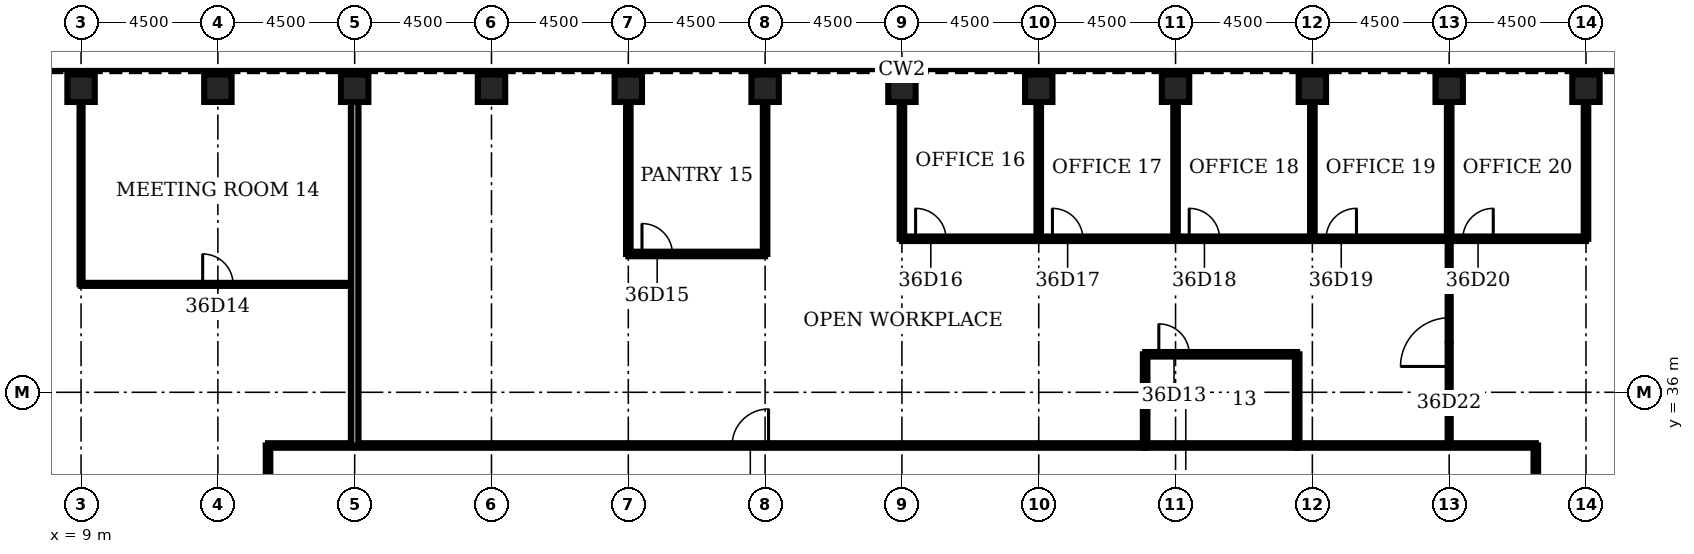
"""IFC4 building model, lengths in metres.
Left out: names, types, materials, properties, quantities, classifications, styles, units other than length and angle.
Written with IfcOpenShell. Run it as: python <this file> out.ifc"""

import sys

from ifc_helpers import new_model, si_unit, direction, frame, frame_2d, origin, origin_2d, place, context, subcontext, project, spatial, rectangle, hollow_rectangle, extrude, element, fill, save


model = new_model("IFC4")
c1 = context("Model", 3, precision=1e-05, world=origin(), true_north=direction((0.0, 1.0)))
c2 = subcontext(c1, "Body", "Model", "MODEL_VIEW")
j1 = project(units=[si_unit("LENGTHUNIT", "METRE"), si_unit("PLANEANGLEUNIT", "RADIAN")], contexts=[c1])
p1 = place(None, origin())
s1 = spatial("IfcSite", under=j1, at=p1, CompositionType="ELEMENT")
p2 = place(p1, origin())
s2 = spatial("IfcBuilding", under=s1, at=p2, CompositionType="ELEMENT")
p3 = place(p2, frame((0.0, 0.0, 163.5)))
s3 = spatial("IfcBuildingStorey", under=s2, at=p3, CompositionType="ELEMENT", Elevation=163.5)
for number, where, z_axis, x_axis in (
    (1, (58.5, 46.0, 0.0), (0.0, 0.0, 1.0), (0.0, 1.0, 0.0)),
    (2, (54.0, 46.0, 0.0), (0.0, 0.0, 1.0), (0.0, 1.0, 0.0)),
    (3, (49.5, 46.0, 0.0), (0.0, 0.0, 1.0), (0.0, 1.0, 0.0)),
    (4, (45.0, 46.0, 0.0), (0.0, 0.0, 1.0), (0.0, 1.0, 0.0)),
    (5, (40.5, 46.0, 0.0), (0.0, 0.0, 1.0), (0.0, 1.0, 0.0)),
    (6, (36.0, 46.0, 0.0), (0.0, 0.0, 1.0), (0.0, 1.0, 0.0)),
    (7, (31.5, 46.0, 0.0), (0.0, 0.0, 1.0), (0.0, 1.0, 0.0)),
    (8, (27.0, 46.0, 0.0), (0.0, 0.0, 1.0), (0.0, 1.0, 0.0)),
    (9, (22.5, 46.0, 0.0), (0.0, 0.0, 1.0), (0.0, 1.0, 0.0)),
    (10, (18.0, 46.0, 0.0), (0.0, 0.0, 1.0), (0.0, 1.0, 0.0)),
    (11, (13.5, 46.0, 0.0), (0.0, 0.0, 1.0), (0.0, 1.0, 0.0)),
    (12, (9.0, 46.0, 0.0), (0.0, 0.0, 1.0), (0.0, 1.0, 0.0)),
):
    element("IfcColumn", number, at=place(p3, frame(where, z_axis=z_axis, x_axis=x_axis)), inside=s3, PredefinedType="COLUMN", context=c2, shape_type="SweptSolid", body=[
        extrude(hollow_rectangle(XDim=0.9, YDim=0.9, WallThickness=0.09, at=origin_2d()), origin(), (0.0, 0.0, 1.0), 4.2),
    ])
p4 = place(p3, frame((15.15, 34.25, 0.0), z_axis=(0.0, 0.0, 1.0), x_axis=(1.0, 0.0, 0.0)))
e13 = element("IfcWall", 13, at=p4, inside=s3, PredefinedType="PARTITIONING", context=c2, shape_type="SweptSolid", body=[
    extrude(rectangle(XDim=28.85, YDim=0.15, at=frame_2d((14.425, 0.0))), origin(), (0.0, 0.0, 1.0), 3.0),
])
p5 = place(p4, frame((15.263, 0.0, 0.0)))
e14 = element("IfcOpeningElement", 14, at=p5, cuts=e13, PredefinedType="OPENING", context=c2, shape_type="SweptSolid", body=[
    extrude(rectangle(XDim=1.2, YDim=2.1, at=frame_2d((0.6, 1.05))), frame((0.0, 0.085, 0.0), z_axis=(0.0, -1.0, 0.0), x_axis=(1.0, 0.0, 0.0)), (0.0, 0.0, 1.0), 0.17),
])
p6 = place(p3, frame((44.0, 34.25, 0.0), z_axis=(0.0, 0.0, 1.0), x_axis=(1.0, 0.0, 0.0)))
e15 = element("IfcWall", 15, at=p6, inside=s3, PredefinedType="PARTITIONING", context=c2, shape_type="SweptSolid", body=[
    extrude(rectangle(XDim=5.0, YDim=0.15, at=frame_2d((2.5, 0.0))), origin(), (0.0, 0.0, 1.0), 3.0),
])
p7 = place(p3, frame((49.0, 34.25, 0.0), z_axis=(0.0, 0.0, 1.0), x_axis=(1.0, 0.0, 0.0)))
e16 = element("IfcWall", 16, at=p7, inside=s3, PredefinedType="PARTITIONING", context=c2, shape_type="SweptSolid", body=[
    extrude(rectangle(XDim=7.85, YDim=0.15, at=frame_2d((3.925, 0.0))), origin(), (0.0, 0.0, 1.0), 3.0),
])
p8 = place(p3, frame((44.0, 37.25, 0.0), z_axis=(0.0, 0.0, 1.0), x_axis=(1.0, 0.0, 0.0)))
e17 = element("IfcWall", 17, at=p8, inside=s3, PredefinedType="PARTITIONING", context=c2, shape_type="SweptSolid", body=[
    extrude(rectangle(XDim=5.0, YDim=0.15, at=frame_2d((2.5, 0.0))), origin(), (0.0, 0.0, 1.0), 3.0),
])
p9 = place(p8, frame((0.45, 0.0, 0.0)))
e18 = element("IfcOpeningElement", 18, at=p9, cuts=e17, PredefinedType="OPENING", context=c2, shape_type="SweptSolid", body=[
    extrude(rectangle(XDim=1.0, YDim=2.1, at=frame_2d((0.5, 1.05))), frame((0.0, 0.085, 0.0), z_axis=(0.0, -1.0, 0.0), x_axis=(1.0, 0.0, 0.0)), (0.0, 0.0, 1.0), 0.17),
])
p10 = place(p3, frame((9.0, 39.55, 0.0), z_axis=(0.0, 0.0, 1.0), x_axis=(1.0, 0.0, 0.0)))
e19 = element("IfcWall", 19, at=p10, inside=s3, PredefinedType="PARTITIONING", context=c2, shape_type="SweptSolid", body=[
    extrude(rectangle(XDim=9.0, YDim=0.1, at=frame_2d((4.5, 0.0))), origin(), (0.0, 0.0, 1.0), 3.0),
])
p11 = place(p10, frame((4.0, 0.0, 0.0)))
e20 = element("IfcOpeningElement", 20, at=p11, cuts=e19, PredefinedType="OPENING", context=c2, shape_type="SweptSolid", body=[
    extrude(rectangle(XDim=1.0, YDim=2.1, at=frame_2d((0.5, 1.05))), frame((0.0, 0.06, 0.0), z_axis=(0.0, -1.0, 0.0), x_axis=(1.0, 0.0, 0.0)), (0.0, 0.0, 1.0), 0.12),
])
p12 = place(p3, frame((27.0, 40.55, 0.0), z_axis=(0.0, 0.0, 1.0), x_axis=(1.0, 0.0, 0.0)))
e21 = element("IfcWall", 21, at=p12, inside=s3, PredefinedType="PARTITIONING", context=c2, shape_type="SweptSolid", body=[
    extrude(rectangle(XDim=4.5, YDim=0.15, at=frame_2d((2.25, 0.0))), origin(), (0.0, 0.0, 1.0), 3.0),
])
p13 = place(p12, frame((0.45, 0.0, 0.0)))
e22 = element("IfcOpeningElement", 22, at=p13, cuts=e21, PredefinedType="OPENING", context=c2, shape_type="SweptSolid", body=[
    extrude(rectangle(XDim=1.0, YDim=2.1, at=frame_2d((0.5, 1.05))), frame((0.0, 0.085, 0.0), z_axis=(0.0, -1.0, 0.0), x_axis=(1.0, 0.0, 0.0)), (0.0, 0.0, 1.0), 0.17),
])
p14 = place(p3, frame((36.0, 41.05, 0.0), z_axis=(0.0, 0.0, 1.0), x_axis=(1.0, 0.0, 0.0)))
e23 = element("IfcWall", 23, at=p14, inside=s3, PredefinedType="PARTITIONING", context=c2, shape_type="SweptSolid", body=[
    extrude(rectangle(XDim=22.5, YDim=0.15, at=frame_2d((11.25, 0.0))), origin(), (0.0, 0.0, 1.0), 3.0),
])
p15 = place(p14, frame((0.45, 0.0, 0.0)))
e24 = element("IfcOpeningElement", 24, at=p15, cuts=e23, PredefinedType="OPENING", context=c2, shape_type="SweptSolid", body=[
    extrude(rectangle(XDim=1.0, YDim=2.1, at=frame_2d((0.5, 1.05))), frame((0.0, 0.085, 0.0), z_axis=(0.0, -1.0, 0.0), x_axis=(1.0, 0.0, 0.0)), (0.0, 0.0, 1.0), 0.17),
])
p16 = place(p14, frame((4.95, 0.0, 0.0)))
e25 = element("IfcOpeningElement", 25, at=p16, cuts=e23, PredefinedType="OPENING", context=c2, shape_type="SweptSolid", body=[
    extrude(rectangle(XDim=1.0, YDim=2.1, at=frame_2d((0.5, 1.05))), frame((0.0, 0.085, 0.0), z_axis=(0.0, -1.0, 0.0), x_axis=(1.0, 0.0, 0.0)), (0.0, 0.0, 1.0), 0.17),
])
p17 = place(p14, frame((9.45, 0.0, 0.0)))
e26 = element("IfcOpeningElement", 26, at=p17, cuts=e23, PredefinedType="OPENING", context=c2, shape_type="SweptSolid", body=[
    extrude(rectangle(XDim=1.0, YDim=2.1, at=frame_2d((0.5, 1.05))), frame((0.0, 0.085, 0.0), z_axis=(0.0, -1.0, 0.0), x_axis=(1.0, 0.0, 0.0)), (0.0, 0.0, 1.0), 0.17),
])
p18 = place(p14, frame((13.95, 0.0, 0.0)))
e27 = element("IfcOpeningElement", 27, at=p18, cuts=e23, PredefinedType="OPENING", context=c2, shape_type="SweptSolid", body=[
    extrude(rectangle(XDim=1.0, YDim=2.1, at=frame_2d((0.5, 1.05))), frame((0.0, 0.085, 0.0), z_axis=(0.0, -1.0, 0.0), x_axis=(1.0, 0.0, 0.0)), (0.0, 0.0, 1.0), 0.17),
])
p19 = place(p14, frame((18.45, 0.0, 0.0)))
e28 = element("IfcOpeningElement", 28, at=p19, cuts=e23, PredefinedType="OPENING", context=c2, shape_type="SweptSolid", body=[
    extrude(rectangle(XDim=1.0, YDim=2.1, at=frame_2d((0.5, 1.05))), frame((0.0, 0.085, 0.0), z_axis=(0.0, -1.0, 0.0), x_axis=(1.0, 0.0, 0.0)), (0.0, 0.0, 1.0), 0.17),
])
p20 = place(p3, frame((9.0, 39.55, 0.0), z_axis=(0.0, 0.0, 1.0), x_axis=(0.0, 1.0, 0.0)))
e29 = element("IfcWall", 29, at=p20, inside=s3, PredefinedType="PARTITIONING", context=c2, shape_type="SweptSolid", body=[
    extrude(rectangle(XDim=6.0, YDim=0.1, at=frame_2d((3.0, 0.0))), origin(), (0.0, 0.0, 1.0), 3.0),
])
p21 = place(p3, frame((15.15, 13.75, 0.0), z_axis=(0.0, 0.0, 1.0), x_axis=(0.0, 1.0, 0.0)))
e30 = element("IfcWall", 30, at=p21, inside=s3, PredefinedType="PARTITIONING", context=c2, shape_type="SweptSolid", body=[
    extrude(rectangle(XDim=20.5, YDim=0.15, at=frame_2d((10.25, 0.0))), origin(), (0.0, 0.0, 1.0), 3.0),
])
p22 = place(p21, frame((9.65, 0.0, 0.0)))
e31 = element("IfcOpeningElement", 31, at=p22, cuts=e30, PredefinedType="OPENING", context=c2, shape_type="SweptSolid", body=[
    extrude(rectangle(XDim=1.2, YDim=2.1, at=frame_2d((0.6, 1.05))), frame((0.0, 0.085, 0.0), z_axis=(0.0, -1.0, 0.0), x_axis=(1.0, 0.0, 0.0)), (0.0, 0.0, 1.0), 0.17),
])
p23 = place(p3, frame((18.0, 34.25, 0.0), z_axis=(0.0, 0.0, 1.0), x_axis=(0.0, 1.0, 0.0)))
e32 = element("IfcWall", 32, at=p23, inside=s3, PredefinedType="PARTITIONING", context=c2, shape_type="SweptSolid", body=[
    extrude(rectangle(XDim=11.3, YDim=0.25, at=frame_2d((5.65, 0.0))), origin(), (0.0, 0.0, 1.0), 3.0),
])
for number, where, z_axis, x_axis in (
    (33, (27.0, 40.55, 0.0), (0.0, 0.0, 1.0), (0.0, 1.0, 0.0)),
    (34, (31.5, 40.55, 0.0), (0.0, 0.0, 1.0), (0.0, 1.0, 0.0)),
):
    element("IfcWall", number, at=place(p3, frame(where, z_axis=z_axis, x_axis=x_axis)), inside=s3, PredefinedType="PARTITIONING", context=c2, shape_type="SweptSolid", body=[
        extrude(rectangle(XDim=5.0, YDim=0.15, at=frame_2d((2.5, 0.0))), origin(), (0.0, 0.0, 1.0), 3.0),
    ])
for number, where, z_axis, x_axis in (
    (35, (36.0, 41.05, 0.0), (0.0, 0.0, 1.0), (0.0, 1.0, 0.0)),
    (36, (40.5, 41.05, 0.0), (0.0, 0.0, 1.0), (0.0, 1.0, 0.0)),
):
    element("IfcWall", number, at=place(p3, frame(where, z_axis=z_axis, x_axis=x_axis)), inside=s3, PredefinedType="PARTITIONING", context=c2, shape_type="SweptSolid", body=[
        extrude(rectangle(XDim=4.5, YDim=0.15, at=frame_2d((2.25, 0.0))), origin(), (0.0, 0.0, 1.0), 3.0),
    ])
p24 = place(p3, frame((44.0, 34.25, 0.0), z_axis=(0.0, 0.0, 1.0), x_axis=(0.0, 1.0, 0.0)))
e37 = element("IfcWall", 37, at=p24, inside=s3, PredefinedType="PARTITIONING", context=c2, shape_type="SweptSolid", body=[
    extrude(rectangle(XDim=3.0, YDim=0.15, at=frame_2d((1.5, 0.0))), origin(), (0.0, 0.0, 1.0), 3.0),
])
p25 = place(p3, frame((45.0, 41.05, 0.0), z_axis=(0.0, 0.0, 1.0), x_axis=(0.0, 1.0, 0.0)))
e38 = element("IfcWall", 38, at=p25, inside=s3, PredefinedType="PARTITIONING", context=c2, shape_type="SweptSolid", body=[
    extrude(rectangle(XDim=4.5, YDim=0.15, at=frame_2d((2.25, 0.0))), origin(), (0.0, 0.0, 1.0), 3.0),
])
p26 = place(p3, frame((49.0, 34.25, 0.0), z_axis=(0.0, 0.0, 1.0), x_axis=(0.0, 1.0, 0.0)))
e39 = element("IfcWall", 39, at=p26, inside=s3, PredefinedType="PARTITIONING", context=c2, shape_type="SweptSolid", body=[
    extrude(rectangle(XDim=3.0, YDim=0.15, at=frame_2d((1.5, 0.0))), origin(), (0.0, 0.0, 1.0), 3.0),
])
p27 = place(p3, frame((49.5, 41.05, 0.0), z_axis=(0.0, 0.0, 1.0), x_axis=(0.0, 1.0, 0.0)))
e40 = element("IfcWall", 40, at=p27, inside=s3, PredefinedType="PARTITIONING", context=c2, shape_type="SweptSolid", body=[
    extrude(rectangle(XDim=4.5, YDim=0.15, at=frame_2d((2.25, 0.0))), origin(), (0.0, 0.0, 1.0), 3.0),
])
p28 = place(p3, frame((54.0, 34.25, 0.0), z_axis=(0.0, 0.0, 1.0), x_axis=(0.0, 1.0, 0.0)))
e41 = element("IfcWall", 41, at=p28, inside=s3, PredefinedType="PARTITIONING", context=c2, shape_type="SweptSolid", body=[
    extrude(rectangle(XDim=6.8, YDim=0.1, at=frame_2d((3.4, 0.0))), origin(), (0.0, 0.0, 1.0), 3.0),
])
p29 = place(p28, frame((2.6, 0.0, 0.0)))
e42 = element("IfcOpeningElement", 42, at=p29, cuts=e41, PredefinedType="OPENING", context=c2, shape_type="SweptSolid", body=[
    extrude(rectangle(XDim=1.6, YDim=2.1, at=frame_2d((0.8, 1.05))), frame((0.0, 0.06, 0.0), z_axis=(0.0, -1.0, 0.0), x_axis=(1.0, 0.0, 0.0)), (0.0, 0.0, 1.0), 0.12),
])
p30 = place(p3, frame((54.0, 41.05, 0.0), z_axis=(0.0, 0.0, 1.0), x_axis=(0.0, 1.0, 0.0)))
e43 = element("IfcWall", 43, at=p30, inside=s3, PredefinedType="PARTITIONING", context=c2, shape_type="SweptSolid", body=[
    extrude(rectangle(XDim=4.5, YDim=0.15, at=frame_2d((2.25, 0.0))), origin(), (0.0, 0.0, 1.0), 3.0),
])
p31 = place(p3, frame((56.85, 13.75, 0.0), z_axis=(0.0, 0.0, 1.0), x_axis=(0.0, 1.0, 0.0)))
e44 = element("IfcWall", 44, at=p31, inside=s3, PredefinedType="PARTITIONING", context=c2, shape_type="SweptSolid", body=[
    extrude(rectangle(XDim=20.5, YDim=0.15, at=frame_2d((10.25, 0.0))), origin(), (0.0, 0.0, 1.0), 3.0),
])
p32 = place(p31, frame((9.65, 0.0, 0.0)))
e45 = element("IfcOpeningElement", 45, at=p32, cuts=e44, PredefinedType="OPENING", context=c2, shape_type="SweptSolid", body=[
    extrude(rectangle(XDim=1.2, YDim=2.1, at=frame_2d((0.6, 1.05))), frame((0.0, 0.085, 0.0), z_axis=(0.0, -1.0, 0.0), x_axis=(1.0, 0.0, 0.0)), (0.0, 0.0, 1.0), 0.17),
])
p33 = place(p3, frame((58.5, 41.05, 0.0), z_axis=(0.0, 0.0, 1.0), x_axis=(0.0, 1.0, 0.0)))
e46 = element("IfcWall", 46, at=p33, inside=s3, PredefinedType="PARTITIONING", context=c2, shape_type="SweptSolid", body=[
    extrude(rectangle(XDim=4.5, YDim=0.15, at=frame_2d((2.25, 0.0))), origin(), (0.0, 0.0, 1.0), 3.0),
])
p34 = place(p9, origin())
e47 = element("IfcDoor", 47, at=p34, inside=s3, OperationType="SINGLE_SWING_LEFT", PredefinedType="DOOR", context=c2, shape_type="SweptSolid", body=[
    extrude(rectangle(XDim=1.0, YDim=2.1, at=frame_2d((0.5, 1.05))), frame((0.0, 0.025, 0.0), z_axis=(0.0, -1.0, 0.0), x_axis=(1.0, 0.0, 0.0)), (0.0, 0.0, 1.0), 0.05),
])
fill(e18, e47)
p35 = place(p11, origin())
e48 = element("IfcDoor", 48, at=p35, inside=s3, OperationType="SINGLE_SWING_LEFT", PredefinedType="DOOR", context=c2, shape_type="SweptSolid", body=[
    extrude(rectangle(XDim=1.0, YDim=2.1, at=frame_2d((0.5, 1.05))), frame((0.0, 0.025, 0.0), z_axis=(0.0, -1.0, 0.0), x_axis=(1.0, 0.0, 0.0)), (0.0, 0.0, 1.0), 0.05),
])
fill(e20, e48)
p36 = place(p13, origin())
e49 = element("IfcDoor", 49, at=p36, inside=s3, OperationType="SINGLE_SWING_LEFT", PredefinedType="DOOR", context=c2, shape_type="SweptSolid", body=[
    extrude(rectangle(XDim=1.0, YDim=2.1, at=frame_2d((0.5, 1.05))), frame((0.0, 0.025, 0.0), z_axis=(0.0, -1.0, 0.0), x_axis=(1.0, 0.0, 0.0)), (0.0, 0.0, 1.0), 0.05),
])
fill(e22, e49)
p37 = place(p15, origin())
e50 = element("IfcDoor", 50, at=p37, inside=s3, OperationType="SINGLE_SWING_LEFT", PredefinedType="DOOR", context=c2, shape_type="SweptSolid", body=[
    extrude(rectangle(XDim=1.0, YDim=2.1, at=frame_2d((0.5, 1.05))), frame((0.0, 0.025, 0.0), z_axis=(0.0, -1.0, 0.0), x_axis=(1.0, 0.0, 0.0)), (0.0, 0.0, 1.0), 0.05),
])
fill(e24, e50)
p38 = place(p16, origin())
e51 = element("IfcDoor", 51, at=p38, inside=s3, OperationType="SINGLE_SWING_LEFT", PredefinedType="DOOR", context=c2, shape_type="SweptSolid", body=[
    extrude(rectangle(XDim=1.0, YDim=2.1, at=frame_2d((0.5, 1.05))), frame((0.0, 0.025, 0.0), z_axis=(0.0, -1.0, 0.0), x_axis=(1.0, 0.0, 0.0)), (0.0, 0.0, 1.0), 0.05),
])
fill(e25, e51)
p39 = place(p17, origin())
e52 = element("IfcDoor", 52, at=p39, inside=s3, OperationType="SINGLE_SWING_LEFT", PredefinedType="DOOR", context=c2, shape_type="SweptSolid", body=[
    extrude(rectangle(XDim=1.0, YDim=2.1, at=frame_2d((0.5, 1.05))), frame((0.0, 0.025, 0.0), z_axis=(0.0, -1.0, 0.0), x_axis=(1.0, 0.0, 0.0)), (0.0, 0.0, 1.0), 0.05),
])
fill(e26, e52)
p40 = place(p18, origin())
e53 = element("IfcDoor", 53, at=p40, inside=s3, OperationType="SINGLE_SWING_RIGHT", PredefinedType="DOOR", context=c2, shape_type="SweptSolid", body=[
    extrude(rectangle(XDim=1.0, YDim=2.1, at=frame_2d((0.5, 1.05))), frame((0.0, 0.025, 0.0), z_axis=(0.0, -1.0, 0.0), x_axis=(1.0, 0.0, 0.0)), (0.0, 0.0, 1.0), 0.05),
])
fill(e27, e53)
p41 = place(p19, origin())
e54 = element("IfcDoor", 54, at=p41, inside=s3, OperationType="SINGLE_SWING_RIGHT", PredefinedType="DOOR", context=c2, shape_type="SweptSolid", body=[
    extrude(rectangle(XDim=1.0, YDim=2.1, at=frame_2d((0.5, 1.05))), frame((0.0, 0.025, 0.0), z_axis=(0.0, -1.0, 0.0), x_axis=(1.0, 0.0, 0.0)), (0.0, 0.0, 1.0), 0.05),
])
fill(e28, e54)
p42 = place(p29, origin())
e55 = element("IfcDoor", 55, at=p42, inside=s3, OperationType="SINGLE_SWING_LEFT", PredefinedType="DOOR", context=c2, shape_type="SweptSolid", body=[
    extrude(rectangle(XDim=1.6, YDim=2.1, at=frame_2d((0.8, 1.05))), frame((0.0, 0.025, 0.0), z_axis=(0.0, -1.0, 0.0), x_axis=(1.0, 0.0, 0.0)), (0.0, 0.0, 1.0), 0.05),
])
fill(e42, e55)
p43 = place(p5, origin())
e56 = element("IfcDoor", 56, at=p43, inside=s3, OperationType="SINGLE_SWING_RIGHT", PredefinedType="DOOR", context=c2, shape_type="SweptSolid", body=[
    extrude(rectangle(XDim=1.2, YDim=2.1, at=frame_2d((0.6, 1.05))), frame((0.0, 0.025, 0.0), z_axis=(0.0, -1.0, 0.0), x_axis=(1.0, 0.0, 0.0)), (0.0, 0.0, 1.0), 0.05),
])
fill(e14, e56)
save(model, sys.argv[1])
